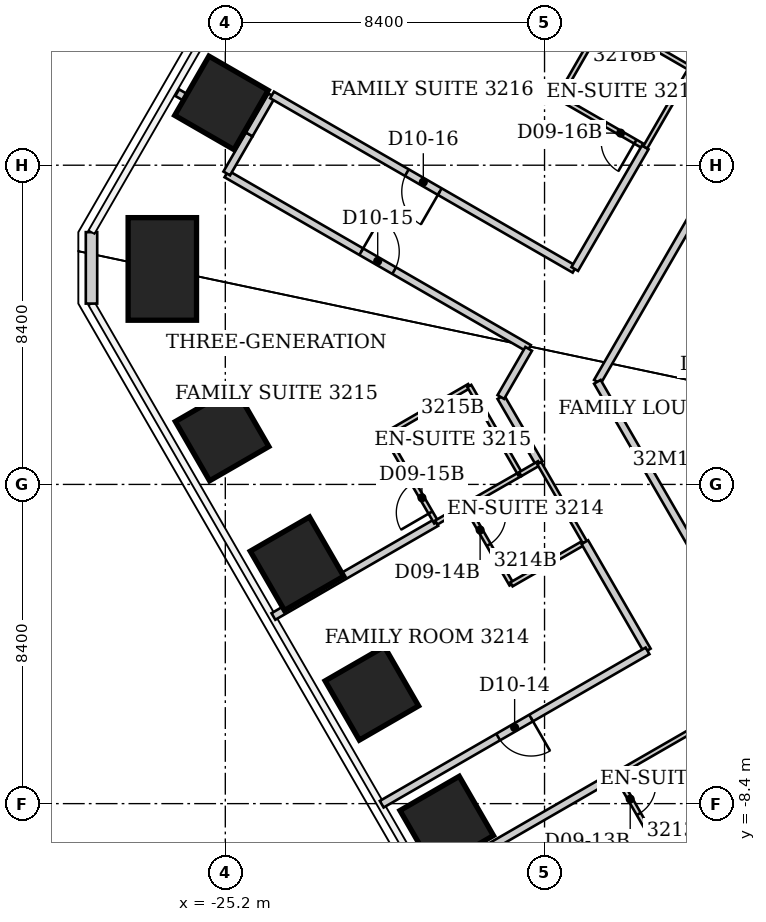
"""IFC4 building model, lengths in metres.
Left out: names, types, materials, properties, quantities, classifications, styles, units other than length and angle.
Written with IfcOpenShell. Run it as: python <this file> out.ifc"""

import sys

from ifc_helpers import new_model, si_unit, direction, frame, frame_2d, origin, origin_2d, place, context, subcontext, project, spatial, rectangle, extrude, element, fill, save


model = new_model("IFC4")
c1 = context("Model", 3, precision=1e-05, world=origin(), true_north=direction((0.0, 1.0)))
c2 = subcontext(c1, "Body", "Model", "MODEL_VIEW")
j1 = project(units=[si_unit("LENGTHUNIT", "METRE"), si_unit("PLANEANGLEUNIT", "RADIAN")], contexts=[c1])
p1 = place(None, origin())
s1 = spatial("IfcSite", under=j1, at=p1, CompositionType="ELEMENT")
p2 = place(p1, origin())
s2 = spatial("IfcBuilding", under=s1, at=p2, CompositionType="ELEMENT")
p3 = place(p2, frame((0.0, 0.0, 131.0)))
s3 = spatial("IfcBuildingStorey", under=s2, at=p3, CompositionType="ELEMENT", Elevation=131.0)
for number, where, z_axis, x_axis in (
    (1, (-19.374, -8.911, 0.0), (0.0, 0.0, 1.0), (-0.866, -0.5, 0.0)),
    (2, (-21.344, -5.499, 0.0), (0.0, 0.0, 1.0), (-0.866, -0.5, 0.0)),
    (3, (-23.314, -2.087, 0.0), (0.0, 0.0, 1.0), (-0.866, -0.5, 0.0)),
    (4, (-25.284, 1.325, 0.0), (0.0, 0.0, 1.0), (-0.866, -0.5, 0.0)),
):
    element("IfcColumn", number, at=place(p3, frame(where, z_axis=z_axis, x_axis=x_axis)), inside=s3, PredefinedType="COLUMN", context=c2, shape_type="SweptSolid", body=[
        extrude(rectangle(XDim=1.8, YDim=1.8, at=origin_2d()), origin(), (0.0, 0.0, 1.0), 3.8),
    ])
p4 = place(p3, frame((-26.857, 5.67, 0.0), z_axis=(0.0, 0.0, 1.0), x_axis=(-1.0, 0.0, 0.0)))
e5 = element("IfcColumn", 5, at=p4, inside=s3, PredefinedType="COLUMN", context=c2, shape_type="SweptSolid", body=[
    extrude(rectangle(XDim=1.8, YDim=2.7, at=origin_2d()), origin(), (0.0, 0.0, 1.0), 3.8),
])
p5 = place(p3, frame((-25.302, 10.041, 0.0), z_axis=(0.0, 0.0, 1.0), x_axis=(-0.866025403784, 0.5, 0.0)))
e6 = element("IfcColumn", 6, at=p5, inside=s3, PredefinedType="COLUMN", context=c2, shape_type="SweptSolid", body=[
    extrude(rectangle(XDim=1.8, YDim=1.8, at=origin_2d()), origin(), (0.0, 0.0, 1.0), 3.8),
])
p6 = place(p3, frame((-28.721, 4.759, 0.0), z_axis=(0.0, 0.0, 1.0), x_axis=(0.0, 1.0, 0.0)))
e7 = element("IfcWall", 7, at=p6, inside=s3, PredefinedType="SOLIDWALL", context=c2, shape_type="SweptSolid", body=[
    extrude(rectangle(XDim=1.88, YDim=0.3, at=frame_2d((0.94, 0.0))), origin(), (0.0, 0.0, 1.0), 3.64),
])
p7 = place(p3, frame((-26.466, 10.31, 0.0), z_axis=(0.0, 0.0, 1.0), x_axis=(0.865037029405, -0.501708020425, 0.0)))
e8 = element("IfcWall", 8, at=p7, inside=s3, PredefinedType="PARTITIONING", context=c2, shape_type="SweptSolid", body=[
    extrude(rectangle(XDim=2.177, YDim=0.2, at=frame_2d((1.089, 0.0))), origin(), (0.0, 0.0, 1.0), 3.64),
])
p8 = place(p3, frame((-25.17, 8.17, 0.0), z_axis=(0.0, 0.0, 1.0), x_axis=(0.866300573619, -0.499523088702, 0.0)))
e9 = element("IfcWall", 9, at=p8, inside=s3, PredefinedType="PARTITIONING", context=c2, shape_type="SweptSolid", body=[
    extrude(rectangle(XDim=9.188, YDim=0.2, at=frame_2d((4.594, 0.0))), origin(), (0.0, 0.0, 1.0), 3.64),
])
p9 = place(p8, frame((4.094, 0.0, 0.0)))
e10 = element("IfcOpeningElement", 10, at=p9, cuts=e9, PredefinedType="OPENING", context=c2, shape_type="SweptSolid", body=[
    extrude(rectangle(XDim=1.0, YDim=2.13, at=frame_2d((0.5, 1.065))), frame((0.0, 0.1, 0.0), z_axis=(0.0, -1.0, 0.0), x_axis=(1.0, 0.0, 0.0)), (0.0, 0.0, 1.0), 0.2),
])
for number, where, z_axis, x_axis in (
    (11, (-24.57, 9.21, 0.0), (0.0, 0.0, 1.0), (-0.5, -0.866, 0.0)),
    (12, (-23.978, 10.237, 0.0), (0.0, 0.0, 1.0), (-0.5, -0.866, 0.0)),
):
    element("IfcWall", number, at=place(p3, frame(where, z_axis=z_axis, x_axis=x_axis)), inside=s3, PredefinedType="PARTITIONING", context=c2, shape_type="SweptSolid", body=[
        extrude(rectangle(XDim=1.186, YDim=0.2, at=frame_2d((0.593, 0.0))), origin(), (0.0, 0.0, 1.0), 3.64),
    ])
p10 = place(p3, frame((-23.934, -3.475, 0.0), z_axis=(0.0, 0.0, 1.0), x_axis=(0.866225835738, 0.49965268087, 0.0)))
e13 = element("IfcWall", 13, at=p10, inside=s3, PredefinedType="PARTITIONING", context=c2, shape_type="SweptSolid", body=[
    extrude(rectangle(XDim=4.948, YDim=0.2, at=frame_2d((2.474, 0.0))), origin(), (0.0, 0.0, 1.0), 3.64),
])
p11 = place(p3, frame((-20.99, 1.31, 0.0), z_axis=(0.0, 0.0, 1.0), x_axis=(0.501789229896, -0.86498992408, 0.0)))
e14 = element("IfcWall", 14, at=p11, inside=s3, PredefinedType="PARTITIONING", context=c2, shape_type="SweptSolid", body=[
    extrude(rectangle(XDim=2.671, YDim=0.12, at=frame_2d((1.335, 0.0))), origin(), (0.0, 0.0, 1.0), 3.64),
])
p12 = place(p11, frame((1.47, 0.0, 0.0)))
e15 = element("IfcOpeningElement", 15, at=p12, cuts=e14, PredefinedType="OPENING", context=c2, shape_type="SweptSolid", body=[
    extrude(rectangle(XDim=0.9, YDim=2.03, at=frame_2d((0.45, 1.015))), frame((0.0, 0.06, 0.0), z_axis=(0.0, -1.0, 0.0), x_axis=(1.0, 0.0, 0.0)), (0.0, 0.0, 1.0), 0.12),
])
p13 = place(p3, frame((-19.884, -10.495, 0.0), z_axis=(0.0, 0.0, 1.0), x_axis=(0.86608558139, 0.499895754841, 0.0)))
e16 = element("IfcWall", 16, at=p13, inside=s3, PredefinedType="PARTITIONING", context=c2, shape_type="SweptSolid", body=[
    extrude(rectangle(XDim=5.732, YDim=0.2, at=frame_2d((2.866, 0.0))), origin(), (0.0, 0.0, 1.0), 3.64),
])
p14 = place(p3, frame((-19.648, -1.003, 0.0), z_axis=(0.0, 0.0, 1.0), x_axis=(0.864260452894, 0.503044599974, 0.0)))
e17 = element("IfcWall", 17, at=p14, inside=s3, PredefinedType="PARTITIONING", context=c2, shape_type="SweptSolid", body=[
    extrude(rectangle(XDim=0.9, YDim=0.12, at=frame_2d((0.45, 0.0))), origin(), (0.0, 0.0, 1.0), 3.64),
])
p15 = place(p3, frame((-18.87, -0.55, 0.0), z_axis=(0.0, 0.0, 1.0), x_axis=(0.499813401482, -0.866133109688, 0.0)))
e18 = element("IfcWall", 18, at=p15, inside=s3, PredefinedType="PARTITIONING", context=c2, shape_type="SweptSolid", body=[
    extrude(rectangle(XDim=2.401, YDim=0.12, at=frame_2d((1.201, 0.0))), origin(), (0.0, 0.0, 1.0), 3.64),
])
p16 = place(p15, frame((0.3, 0.0, 0.0)))
e19 = element("IfcOpeningElement", 19, at=p16, cuts=e18, PredefinedType="OPENING", context=c2, shape_type="SweptSolid", body=[
    extrude(rectangle(XDim=0.9, YDim=2.03, at=frame_2d((0.45, 1.015))), frame((0.0, 0.06, 0.0), z_axis=(0.0, -1.0, 0.0), x_axis=(1.0, 0.0, 0.0)), (0.0, 0.0, 1.0), 0.12),
])
p17 = place(p3, frame((-18.87, -0.55, 0.0), z_axis=(0.0, 0.0, 1.0), x_axis=(0.867504015586, 0.497430178961, 0.0)))
e20 = element("IfcWall", 20, at=p17, inside=s3, PredefinedType="PARTITIONING", context=c2, shape_type="SweptSolid", body=[
    extrude(rectangle(XDim=1.649, YDim=0.12, at=frame_2d((0.824, 0.0))), origin(), (0.0, 0.0, 1.0), 3.64),
])
p18 = place(p3, frame((-18.78, 2.59, 0.0), z_axis=(0.0, 0.0, 1.0), x_axis=(-0.865328095335, -0.50120583339, 0.0)))
e21 = element("IfcWall", 21, at=p18, inside=s3, PredefinedType="PARTITIONING", context=c2, shape_type="SweptSolid", body=[
    extrude(rectangle(XDim=2.554, YDim=0.12, at=frame_2d((1.277, 0.0))), origin(), (0.0, 0.0, 1.0), 3.64),
])
p19 = place(p3, frame((-17.95, 2.3, 0.0), z_axis=(0.0, 0.0, 1.0), x_axis=(0.502021340952, -0.864855232527, 0.0)))
e22 = element("IfcWall", 22, at=p19, inside=s3, PredefinedType="PARTITIONING", context=c2, shape_type="SweptSolid", body=[
    extrude(rectangle(XDim=2.012, YDim=0.2, at=frame_2d((1.006, 0.0))), origin(), (0.0, 0.0, 1.0), 3.64),
])
p20 = place(p3, frame((-17.67, -2.63, 0.0), z_axis=(0.0, 0.0, 1.0), x_axis=(0.86687668408, 0.498522631983, 0.0)))
e23 = element("IfcWall", 23, at=p20, inside=s3, PredefinedType="PARTITIONING", context=c2, shape_type="SweptSolid", body=[
    extrude(rectangle(XDim=2.226, YDim=0.12, at=frame_2d((1.113, 0.0))), origin(), (0.0, 0.0, 1.0), 3.64),
])
p21 = place(p3, frame((-17.44, 0.27, 0.0), z_axis=(0.0, 0.0, 1.0), x_axis=(-0.500166770141, 0.865929097586, 0.0)))
e24 = element("IfcWall", 24, at=p21, inside=s3, PredefinedType="PARTITIONING", context=c2, shape_type="SweptSolid", body=[
    extrude(rectangle(XDim=2.679, YDim=0.12, at=frame_2d((1.34, 0.0))), origin(), (0.0, 0.0, 1.0), 3.64),
])
p22 = place(p3, frame((-17.44, 0.27, 0.0), z_axis=(0.0, 0.0, 1.0), x_axis=(0.865001858693, 0.501768656312, 0.0)))
e25 = element("IfcWall", 25, at=p22, inside=s3, PredefinedType="PARTITIONING", context=c2, shape_type="SweptSolid", body=[
    extrude(rectangle(XDim=0.578, YDim=0.12, at=frame_2d((0.289, 0.0))), origin(), (0.0, 0.0, 1.0), 3.64),
])
p23 = place(p3, frame((-17.218, 3.567, 0.0), z_axis=(0.0, 0.0, 1.0), x_axis=(-0.500516625994, -0.865726924095, 0.0)))
e26 = element("IfcWall", 26, at=p23, inside=s3, PredefinedType="PARTITIONING", context=c2, shape_type="SweptSolid", body=[
    extrude(rectangle(XDim=1.463, YDim=0.2, at=frame_2d((0.732, 0.0))), origin(), (0.0, 0.0, 1.0), 3.64),
])
p24 = place(p3, frame((-16.94, 0.56, 0.0), z_axis=(0.0, 0.0, 1.0), x_axis=(0.499693115345, -0.866202511239, 0.0)))
e27 = element("IfcWall", 27, at=p24, inside=s3, PredefinedType="PARTITIONING", context=c2, shape_type="SweptSolid", body=[
    extrude(rectangle(XDim=2.401, YDim=0.12, at=frame_2d((1.201, 0.0))), origin(), (0.0, 0.0, 1.0), 3.64),
])
p25 = place(p3, frame((-16.42, 10.18, 0.0), z_axis=(0.0, 0.0, 1.0), x_axis=(0.866114241029, -0.499846097802, 0.0)))
e28 = element("IfcWall", 28, at=p25, inside=s3, PredefinedType="PARTITIONING", context=c2, shape_type="SweptSolid", body=[
    extrude(rectangle(XDim=2.621, YDim=0.12, at=frame_2d((1.311, 0.0))), origin(), (0.0, 0.0, 1.0), 3.64),
])
p26 = place(p25, frame((1.421, 0.0, 0.0)))
e29 = element("IfcOpeningElement", 29, at=p26, cuts=e28, PredefinedType="OPENING", context=c2, shape_type="SweptSolid", body=[
    extrude(rectangle(XDim=0.9, YDim=2.03, at=frame_2d((0.45, 1.015))), frame((0.0, 0.06, 0.0), z_axis=(0.0, -1.0, 0.0), x_axis=(1.0, 0.0, 0.0)), (0.0, 0.0, 1.0), 0.12),
])
p27 = place(p3, frame((-16.01, 5.66, 0.0), z_axis=(0.0, 0.0, 1.0), x_axis=(-0.866289075554, 0.499543028754, 0.0)))
e30 = element("IfcWall", 30, at=p27, inside=s3, PredefinedType="PARTITIONING", context=c2, shape_type="SweptSolid", body=[
    extrude(rectangle(XDim=9.188, YDim=0.2, at=frame_2d((4.594, 0.0))), origin(), (0.0, 0.0, 1.0), 3.64),
])
p28 = place(p27, frame((4.094, 0.0, 0.0)))
e31 = element("IfcOpeningElement", 31, at=p28, cuts=e30, PredefinedType="OPENING", context=c2, shape_type="SweptSolid", body=[
    extrude(rectangle(XDim=1.0, YDim=2.13, at=frame_2d((0.5, 1.065))), frame((0.0, 0.1, 0.0), z_axis=(0.0, -1.0, 0.0), x_axis=(1.0, 0.0, 0.0)), (0.0, 0.0, 1.0), 0.2),
])
p29 = place(p3, frame((-16.005, 5.669, 0.0), z_axis=(0.0, 0.0, 1.0), x_axis=(0.501374384923, 0.865230446842, 0.0)))
e32 = element("IfcWall", 32, at=p29, inside=s3, PredefinedType="PARTITIONING", context=c2, shape_type="SweptSolid", body=[
    extrude(rectangle(XDim=3.7, YDim=0.2, at=frame_2d((1.85, 0.0))), origin(), (0.0, 0.0, 1.0), 3.64),
])
p30 = place(p3, frame((-15.74, -1.52, 0.0), z_axis=(0.0, 0.0, 1.0), x_axis=(0.499728874041, -0.866181881853, 0.0)))
e33 = element("IfcWall", 33, at=p30, inside=s3, PredefinedType="PARTITIONING", context=c2, shape_type="SweptSolid", body=[
    extrude(rectangle(XDim=3.292, YDim=0.2, at=frame_2d((1.646, 0.0))), origin(), (0.0, 0.0, 1.0), 3.64),
])
p31 = place(p3, frame((-15.41, 2.7, 0.0), z_axis=(0.0, 0.0, 1.0), x_axis=(0.500296290322, 0.865854272894, 0.0)))
e34 = element("IfcWall", 34, at=p31, inside=s3, PredefinedType="PARTITIONING", context=c2, shape_type="SweptSolid", body=[
    extrude(rectangle(XDim=9.574, YDim=0.2, at=frame_2d((4.787, 0.0))), origin(), (0.0, 0.0, 1.0), 3.64),
])
p32 = place(p3, frame((-15.22, 12.26, 0.0), z_axis=(0.0, 0.0, 1.0), x_axis=(-0.499693115345, -0.866202511239, 0.0)))
e35 = element("IfcWall", 35, at=p32, inside=s3, PredefinedType="PARTITIONING", context=c2, shape_type="SweptSolid", body=[
    extrude(rectangle(XDim=2.401, YDim=0.12, at=frame_2d((1.201, 0.0))), origin(), (0.0, 0.0, 1.0), 3.64),
])
p33 = place(p3, frame((-14.92, -7.63, 0.0), z_axis=(0.0, 0.0, 1.0), x_axis=(0.498665353881, -0.866794592068, 0.0)))
e36 = element("IfcWall", 36, at=p33, inside=s3, PredefinedType="PARTITIONING", context=c2, shape_type="SweptSolid", body=[
    extrude(rectangle(XDim=2.527, YDim=0.12, at=frame_2d((1.263, 0.0))), origin(), (0.0, 0.0, 1.0), 3.64),
])
p34 = place(p33, frame((0.3, 0.0, 0.0)))
e37 = element("IfcOpeningElement", 37, at=p34, cuts=e36, PredefinedType="OPENING", context=c2, shape_type="SweptSolid", body=[
    extrude(rectangle(XDim=0.9, YDim=2.03, at=frame_2d((0.45, 1.015))), frame((0.0, 0.06, 0.0), z_axis=(0.0, -1.0, 0.0), x_axis=(1.0, 0.0, 0.0)), (0.0, 0.0, 1.0), 0.12),
])
p35 = place(p3, frame((-14.92, -7.63, 0.0), z_axis=(0.0, 0.0, 1.0), x_axis=(0.866390229467, 0.499367570316, 0.0)))
e38 = element("IfcWall", 38, at=p35, inside=s3, PredefinedType="PARTITIONING", context=c2, shape_type="SweptSolid", body=[
    extrude(rectangle(XDim=2.343, YDim=0.12, at=frame_2d((1.171, 0.0))), origin(), (0.0, 0.0, 1.0), 3.64),
])
p36 = place(p3, frame((-14.15, 8.87, 0.0), z_axis=(0.0, 0.0, 1.0), x_axis=(0.500401517907, 0.865793463175, 0.0)))
e39 = element("IfcWall", 39, at=p36, inside=s3, PredefinedType="PARTITIONING", context=c2, shape_type="SweptSolid", body=[
    extrude(rectangle(XDim=2.396, YDim=0.12, at=frame_2d((1.198, 0.0))), origin(), (0.0, 0.0, 1.0), 3.64),
])
p37 = place(p3, frame((-14.09, -4.38, 0.0), z_axis=(0.0, 0.0, 1.0), x_axis=(-0.866174008169, -0.499742521277, 0.0)))
e40 = element("IfcWall", 40, at=p37, inside=s3, PredefinedType="PARTITIONING", context=c2, shape_type="SweptSolid", body=[
    extrude(rectangle(XDim=8.074, YDim=0.2, at=frame_2d((4.037, 0.0))), origin(), (0.0, 0.0, 1.0), 3.64),
])
p38 = place(p37, frame((3.537, 0.0, 0.0)))
e41 = element("IfcOpeningElement", 41, at=p38, cuts=e40, PredefinedType="OPENING", context=c2, shape_type="SweptSolid", body=[
    extrude(rectangle(XDim=1.0, YDim=2.13, at=frame_2d((0.5, 1.065))), frame((0.0, 0.1, 0.0), z_axis=(0.0, -1.0, 0.0), x_axis=(1.0, 0.0, 0.0)), (0.0, 0.0, 1.0), 0.2),
])
p39 = place(p3, frame((-13.821, 11.448, 0.0), z_axis=(0.0, 0.0, 1.0), x_axis=(0.865694957185, -0.500571914019, 0.0)))
e42 = element("IfcWall", 42, at=p39, inside=s3, PredefinedType="PARTITIONING", context=c2, shape_type="SweptSolid", body=[
    extrude(rectangle(XDim=0.995, YDim=0.12, at=frame_2d((0.498, 0.0))), origin(), (0.0, 0.0, 1.0), 3.64),
])
p40 = place(p3, frame((-13.66, -9.82, 0.0), z_axis=(0.0, 0.0, 1.0), x_axis=(0.866345142729, 0.499445786517, 0.0)))
e43 = element("IfcWall", 43, at=p40, inside=s3, PredefinedType="PARTITIONING", context=c2, shape_type="SweptSolid", body=[
    extrude(rectangle(XDim=2.343, YDim=0.12, at=frame_2d((1.171, 0.0))), origin(), (0.0, 0.0, 1.0), 3.64),
])
p41 = place(p3, frame((-10.948, -5.021, 0.0), z_axis=(0.0, 0.0, 1.0), x_axis=(-0.500384322182, 0.865803401538, 0.0)))
e44 = element("IfcWall", 44, at=p41, inside=s3, PredefinedType="PARTITIONING", context=c2, shape_type="SweptSolid", body=[
    extrude(rectangle(XDim=8.918, YDim=0.2, at=frame_2d((4.459, 0.0))), origin(), (0.0, 0.0, 1.0), 3.64),
])
p42 = place(p34, origin())
e45 = element("IfcDoor", 45, at=p42, inside=s3, OperationType="SINGLE_SWING_LEFT", PredefinedType="DOOR", context=c2, shape_type="SweptSolid", body=[
    extrude(rectangle(XDim=0.9, YDim=2.03, at=frame_2d((0.45, 1.015))), frame((0.0, 0.025, 0.0), z_axis=(0.0, -1.0, 0.0), x_axis=(1.0, 0.0, 0.0)), (0.0, 0.0, 1.0), 0.05),
])
fill(e37, e45)
p43 = place(p38, origin())
e46 = element("IfcDoor", 46, at=p43, inside=s3, OperationType="SINGLE_SWING_LEFT", PredefinedType="DOOR", context=c2, shape_type="SweptSolid", body=[
    extrude(rectangle(XDim=1.0, YDim=2.13, at=frame_2d((0.5, 1.065))), frame((0.0, 0.025, 0.0), z_axis=(0.0, -1.0, 0.0), x_axis=(1.0, 0.0, 0.0)), (0.0, 0.0, 1.0), 0.05),
])
fill(e41, e46)
p44 = place(p16, origin())
e47 = element("IfcDoor", 47, at=p44, inside=s3, OperationType="SINGLE_SWING_LEFT", PredefinedType="DOOR", context=c2, shape_type="SweptSolid", body=[
    extrude(rectangle(XDim=0.9, YDim=2.03, at=frame_2d((0.45, 1.015))), frame((0.0, 0.025, 0.0), z_axis=(0.0, -1.0, 0.0), x_axis=(1.0, 0.0, 0.0)), (0.0, 0.0, 1.0), 0.05),
])
fill(e19, e47)
p45 = place(p9, origin())
e48 = element("IfcDoor", 48, at=p45, inside=s3, OperationType="SINGLE_SWING_LEFT", PredefinedType="DOOR", context=c2, shape_type="SweptSolid", body=[
    extrude(rectangle(XDim=1.0, YDim=2.13, at=frame_2d((0.5, 1.065))), frame((0.0, 0.025, 0.0), z_axis=(0.0, -1.0, 0.0), x_axis=(1.0, 0.0, 0.0)), (0.0, 0.0, 1.0), 0.05),
])
fill(e10, e48)
p46 = place(p12, origin())
e49 = element("IfcDoor", 49, at=p46, inside=s3, OperationType="SINGLE_SWING_RIGHT", PredefinedType="DOOR", context=c2, shape_type="SweptSolid", body=[
    extrude(rectangle(XDim=0.9, YDim=2.03, at=frame_2d((0.45, 1.015))), frame((0.0, 0.025, 0.0), z_axis=(0.0, -1.0, 0.0), x_axis=(1.0, 0.0, 0.0)), (0.0, 0.0, 1.0), 0.05),
])
fill(e15, e49)
p47 = place(p28, origin())
e50 = element("IfcDoor", 50, at=p47, inside=s3, OperationType="SINGLE_SWING_LEFT", PredefinedType="DOOR", context=c2, shape_type="SweptSolid", body=[
    extrude(rectangle(XDim=1.0, YDim=2.13, at=frame_2d((0.5, 1.065))), frame((0.0, 0.025, 0.0), z_axis=(0.0, -1.0, 0.0), x_axis=(1.0, 0.0, 0.0)), (0.0, 0.0, 1.0), 0.05),
])
fill(e31, e50)
p48 = place(p26, origin())
e51 = element("IfcDoor", 51, at=p48, inside=s3, OperationType="SINGLE_SWING_RIGHT", PredefinedType="DOOR", context=c2, shape_type="SweptSolid", body=[
    extrude(rectangle(XDim=0.9, YDim=2.03, at=frame_2d((0.45, 1.015))), frame((0.0, 0.025, 0.0), z_axis=(0.0, -1.0, 0.0), x_axis=(1.0, 0.0, 0.0)), (0.0, 0.0, 1.0), 0.05),
])
fill(e29, e51)
save(model, sys.argv[1])
